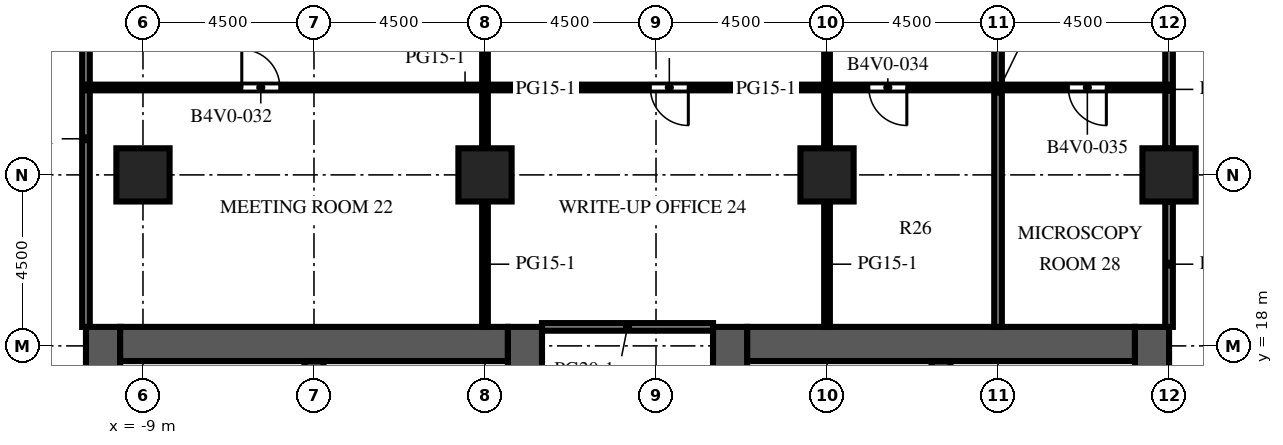
"""IFC4 building model, lengths in metres.
Left out: names, types, materials, properties, quantities, classifications, styles, units other than length and angle.
Written with IfcOpenShell. Run it as: python <this file> out.ifc"""

import sys

from ifc_helpers import new_model, si_unit, direction, frame, frame_2d, origin, origin_2d, place, context, subcontext, project, spatial, rectangle, extrude, element, fill, save


model = new_model("IFC4")
c1 = context("Model", 3, precision=1e-05, world=origin(), true_north=direction((0.0, 1.0)))
c2 = subcontext(c1, "Body", "Model", "MODEL_VIEW")
j1 = project(units=[si_unit("LENGTHUNIT", "METRE"), si_unit("PLANEANGLEUNIT", "RADIAN")], contexts=[c1])
p1 = place(None, origin())
s1 = spatial("IfcSite", under=j1, at=p1, CompositionType="ELEMENT")
p2 = place(p1, origin())
s2 = spatial("IfcBuilding", under=s1, at=p2, CompositionType="ELEMENT")
p3 = place(p2, frame((0.0, 0.0, 120.8)))
s3 = spatial("IfcBuildingStorey", under=s2, at=p3, CompositionType="ELEMENT", Elevation=120.8)
for number, where, z_axis, x_axis in (
    (1, (-9.0, 22.5, 0.0), (0.0, 0.0, 1.0), (1.0, 0.0, 0.0)),
    (2, (0.0, 22.5, 0.0), (0.0, 0.0, 1.0), (1.0, 0.0, 0.0)),
    (3, (9.0, 22.5, 0.0), (0.0, 0.0, 1.0), (1.0, 0.0, 0.0)),
    (4, (18.0, 22.5, 0.0), (0.0, 0.0, 1.0), (1.0, 0.0, 0.0)),
):
    element("IfcColumn", number, at=place(p3, frame(where, z_axis=z_axis, x_axis=x_axis)), inside=s3, PredefinedType="COLUMN", context=c2, shape_type="SweptSolid", body=[
        extrude(rectangle(XDim=1.4, YDim=1.4, at=origin_2d()), origin(), (0.0, 0.0, 1.0), 4.1),
    ])
p4 = place(p3, frame((-10.05, -9.0, 0.0), z_axis=(0.0, 0.0, 1.0), x_axis=(0.0, 1.0, 0.0)))
e5 = element("IfcWall", 5, at=p4, inside=s3, PredefinedType="SHEAR", context=c2, shape_type="SweptSolid", body=[
    extrude(rectangle(XDim=27.5, YDim=0.9, at=frame_2d((13.75, 0.0))), origin(), (0.0, 0.0, 1.0), 4.1),
])
p5 = place(p4, frame((12.55, 0.0, 0.0)))
e6 = element("IfcOpeningElement", 6, at=p5, cuts=e5, PredefinedType="OPENING", context=c2, shape_type="SweptSolid", body=[
    extrude(rectangle(XDim=2.4, YDim=2.4, at=frame_2d((1.2, 1.2))), frame((0.0, 0.46, 0.0), z_axis=(0.0, -1.0, 0.0), x_axis=(1.0, 0.0, 0.0)), (0.0, 0.0, 1.0), 0.92),
])
p6 = place(p4, frame((6.825, 0.0, 0.0)))
e7 = element("IfcOpeningElement", 7, at=p6, cuts=e5, PredefinedType="OPENING", context=c2, shape_type="SweptSolid", body=[
    extrude(rectangle(XDim=1.2, YDim=2.1, at=frame_2d((0.6, 1.05))), frame((0.0, 0.46, 0.0), z_axis=(0.0, -1.0, 0.0), x_axis=(1.0, 0.0, 0.0)), (0.0, 0.0, 1.0), 0.92),
])
p7 = place(p4, frame((19.475, 0.0, 0.0)))
e8 = element("IfcOpeningElement", 8, at=p7, cuts=e5, PredefinedType="OPENING", context=c2, shape_type="SweptSolid", body=[
    extrude(rectangle(XDim=1.2, YDim=2.1, at=frame_2d((0.6, 1.05))), frame((0.0, 0.46, 0.0), z_axis=(0.0, -1.0, 0.0), x_axis=(1.0, 0.0, 0.0)), (0.0, 0.0, 1.0), 0.92),
])
p8 = place(p3, frame((1.05, -9.0, 0.0), z_axis=(0.0, 0.0, 1.0), x_axis=(0.0, 1.0, 0.0)))
e9 = element("IfcWall", 9, at=p8, inside=s3, PredefinedType="SHEAR", context=c2, shape_type="SweptSolid", body=[
    extrude(rectangle(XDim=27.5, YDim=0.9, at=frame_2d((13.75, 0.0))), origin(), (0.0, 0.0, 1.0), 4.1),
])
p9 = place(p8, frame((12.55, 0.0, 0.0)))
e10 = element("IfcOpeningElement", 10, at=p9, cuts=e9, PredefinedType="OPENING", context=c2, shape_type="SweptSolid", body=[
    extrude(rectangle(XDim=2.4, YDim=2.4, at=frame_2d((1.2, 1.2))), frame((0.0, 0.46, 0.0), z_axis=(0.0, -1.0, 0.0), x_axis=(1.0, 0.0, 0.0)), (0.0, 0.0, 1.0), 0.92),
])
p10 = place(p8, frame((3.975, 0.0, 0.0)))
e11 = element("IfcOpeningElement", 11, at=p10, cuts=e9, PredefinedType="OPENING", context=c2, shape_type="SweptSolid", body=[
    extrude(rectangle(XDim=1.2, YDim=2.1, at=frame_2d((0.6, 1.05))), frame((0.0, 0.46, 0.0), z_axis=(0.0, -1.0, 0.0), x_axis=(1.0, 0.0, 0.0)), (0.0, 0.0, 1.0), 0.92),
])
p11 = place(p8, frame((19.485, 0.0, 0.0)))
e12 = element("IfcOpeningElement", 12, at=p11, cuts=e9, PredefinedType="OPENING", context=c2, shape_type="SweptSolid", body=[
    extrude(rectangle(XDim=1.0, YDim=2.1, at=frame_2d((0.5, 1.05))), frame((0.0, 0.46, 0.0), z_axis=(0.0, -1.0, 0.0), x_axis=(1.0, 0.0, 0.0)), (0.0, 0.0, 1.0), 0.92),
])
p12 = place(p8, frame((21.139, 0.0, 0.0)))
e13 = element("IfcOpeningElement", 13, at=p12, cuts=e9, PredefinedType="OPENING", context=c2, shape_type="SweptSolid", body=[
    extrude(rectangle(XDim=1.0, YDim=2.1, at=frame_2d((0.5, 1.05))), frame((0.0, 0.46, 0.0), z_axis=(0.0, -1.0, 0.0), x_axis=(1.0, 0.0, 0.0)), (0.0, 0.0, 1.0), 0.92),
])
p13 = place(p8, frame((23.16, 0.0, 0.0)))
e14 = element("IfcOpeningElement", 14, at=p13, cuts=e9, PredefinedType="OPENING", context=c2, shape_type="SweptSolid", body=[
    extrude(rectangle(XDim=1.0, YDim=2.1, at=frame_2d((0.5, 1.05))), frame((0.0, 0.46, 0.0), z_axis=(0.0, -1.0, 0.0), x_axis=(1.0, 0.0, 0.0)), (0.0, 0.0, 1.0), 0.92),
])
p14 = place(p8, frame((25.181, 0.0, 0.0)))
e15 = element("IfcOpeningElement", 15, at=p14, cuts=e9, PredefinedType="OPENING", context=c2, shape_type="SweptSolid", body=[
    extrude(rectangle(XDim=1.0, YDim=2.1, at=frame_2d((0.5, 1.05))), frame((0.0, 0.46, 0.0), z_axis=(0.0, -1.0, 0.0), x_axis=(1.0, 0.0, 0.0)), (0.0, 0.0, 1.0), 0.92),
])
p15 = place(p3, frame((-9.6, 18.05, 0.0), z_axis=(0.0, 0.0, 1.0), x_axis=(1.0, 0.0, 0.0)))
e16 = element("IfcWall", 16, at=p15, inside=s3, PredefinedType="SHEAR", context=c2, shape_type="SweptSolid", body=[
    extrude(rectangle(XDim=10.2, YDim=0.9, at=frame_2d((5.1, 0.0))), origin(), (0.0, 0.0, 1.0), 4.1),
])
p16 = place(p3, frame((-4.5, 10.25, 0.0), z_axis=(0.0, 0.0, 1.0), x_axis=(0.0, 1.0, 0.0)))
e17 = element("IfcWall", 17, at=p16, inside=s3, PredefinedType="SHEAR", context=c2, shape_type="SweptSolid", body=[
    extrude(rectangle(XDim=7.35, YDim=0.5, at=frame_2d((3.675, 0.0))), origin(), (0.0, 0.0, 1.0), 4.1),
])
p17 = place(p3, frame((6.45, -9.0, 0.0), z_axis=(0.0, 0.0, 1.0), x_axis=(0.0, 1.0, 0.0)))
e18 = element("IfcWall", 18, at=p17, inside=s3, PredefinedType="SHEAR", context=c2, shape_type="SweptSolid", body=[
    extrude(rectangle(XDim=27.5, YDim=0.9, at=frame_2d((13.75, 0.0))), origin(), (0.0, 0.0, 1.0), 4.1),
])
p18 = place(p17, frame((12.55, 0.0, 0.0)))
e19 = element("IfcOpeningElement", 19, at=p18, cuts=e18, PredefinedType="OPENING", context=c2, shape_type="SweptSolid", body=[
    extrude(rectangle(XDim=2.4, YDim=2.4, at=frame_2d((1.2, 1.2))), frame((0.0, 0.46, 0.0), z_axis=(0.0, -1.0, 0.0), x_axis=(1.0, 0.0, 0.0)), (0.0, 0.0, 1.0), 0.92),
])
p19 = place(p17, frame((3.975, 0.0, 0.0)))
e20 = element("IfcOpeningElement", 20, at=p19, cuts=e18, PredefinedType="OPENING", context=c2, shape_type="SweptSolid", body=[
    extrude(rectangle(XDim=1.2, YDim=2.1, at=frame_2d((0.6, 1.05))), frame((0.0, 0.46, 0.0), z_axis=(0.0, -1.0, 0.0), x_axis=(1.0, 0.0, 0.0)), (0.0, 0.0, 1.0), 0.92),
])
p20 = place(p17, frame((19.485, 0.0, 0.0)))
e21 = element("IfcOpeningElement", 21, at=p20, cuts=e18, PredefinedType="OPENING", context=c2, shape_type="SweptSolid", body=[
    extrude(rectangle(XDim=1.0, YDim=2.1, at=frame_2d((0.5, 1.05))), frame((0.0, 0.46, 0.0), z_axis=(0.0, -1.0, 0.0), x_axis=(1.0, 0.0, 0.0)), (0.0, 0.0, 1.0), 0.92),
])
p21 = place(p17, frame((21.139, 0.0, 0.0)))
e22 = element("IfcOpeningElement", 22, at=p21, cuts=e18, PredefinedType="OPENING", context=c2, shape_type="SweptSolid", body=[
    extrude(rectangle(XDim=1.0, YDim=2.1, at=frame_2d((0.5, 1.05))), frame((0.0, 0.46, 0.0), z_axis=(0.0, -1.0, 0.0), x_axis=(1.0, 0.0, 0.0)), (0.0, 0.0, 1.0), 0.92),
])
p22 = place(p17, frame((23.16, 0.0, 0.0)))
e23 = element("IfcOpeningElement", 23, at=p22, cuts=e18, PredefinedType="OPENING", context=c2, shape_type="SweptSolid", body=[
    extrude(rectangle(XDim=1.0, YDim=2.1, at=frame_2d((0.5, 1.05))), frame((0.0, 0.46, 0.0), z_axis=(0.0, -1.0, 0.0), x_axis=(1.0, 0.0, 0.0)), (0.0, 0.0, 1.0), 0.92),
])
p23 = place(p17, frame((25.181, 0.0, 0.0)))
e24 = element("IfcOpeningElement", 24, at=p23, cuts=e18, PredefinedType="OPENING", context=c2, shape_type="SweptSolid", body=[
    extrude(rectangle(XDim=1.0, YDim=2.1, at=frame_2d((0.5, 1.05))), frame((0.0, 0.46, 0.0), z_axis=(0.0, -1.0, 0.0), x_axis=(1.0, 0.0, 0.0)), (0.0, 0.0, 1.0), 0.92),
])
p24 = place(p3, frame((17.55, -9.0, 0.0), z_axis=(0.0, 0.0, 1.0), x_axis=(0.0, 1.0, 0.0)))
e25 = element("IfcWall", 25, at=p24, inside=s3, PredefinedType="SHEAR", context=c2, shape_type="SweptSolid", body=[
    extrude(rectangle(XDim=27.5, YDim=0.9, at=frame_2d((13.75, 0.0))), origin(), (0.0, 0.0, 1.0), 4.1),
])
p25 = place(p24, frame((12.55, 0.0, 0.0)))
e26 = element("IfcOpeningElement", 26, at=p25, cuts=e25, PredefinedType="OPENING", context=c2, shape_type="SweptSolid", body=[
    extrude(rectangle(XDim=2.4, YDim=2.4, at=frame_2d((1.2, 1.2))), frame((0.0, 0.46, 0.0), z_axis=(0.0, -1.0, 0.0), x_axis=(1.0, 0.0, 0.0)), (0.0, 0.0, 1.0), 0.92),
])
p26 = place(p24, frame((6.825, 0.0, 0.0)))
e27 = element("IfcOpeningElement", 27, at=p26, cuts=e25, PredefinedType="OPENING", context=c2, shape_type="SweptSolid", body=[
    extrude(rectangle(XDim=1.2, YDim=2.1, at=frame_2d((0.6, 1.05))), frame((0.0, 0.46, 0.0), z_axis=(0.0, -1.0, 0.0), x_axis=(1.0, 0.0, 0.0)), (0.0, 0.0, 1.0), 0.92),
])
p27 = place(p24, frame((19.475, 0.0, 0.0)))
e28 = element("IfcOpeningElement", 28, at=p27, cuts=e25, PredefinedType="OPENING", context=c2, shape_type="SweptSolid", body=[
    extrude(rectangle(XDim=1.2, YDim=2.1, at=frame_2d((0.6, 1.05))), frame((0.0, 0.46, 0.0), z_axis=(0.0, -1.0, 0.0), x_axis=(1.0, 0.0, 0.0)), (0.0, 0.0, 1.0), 0.92),
])
p28 = place(p3, frame((6.9, 18.05, 0.0), z_axis=(0.0, 0.0, 1.0), x_axis=(1.0, 0.0, 0.0)))
e29 = element("IfcWall", 29, at=p28, inside=s3, PredefinedType="SHEAR", context=c2, shape_type="SweptSolid", body=[
    extrude(rectangle(XDim=10.2, YDim=0.9, at=frame_2d((5.1, 0.0))), origin(), (0.0, 0.0, 1.0), 4.1),
])
p29 = place(p3, frame((12.0, 10.25, 0.0), z_axis=(0.0, 0.0, 1.0), x_axis=(0.0, 1.0, 0.0)))
e30 = element("IfcWall", 30, at=p29, inside=s3, PredefinedType="SHEAR", context=c2, shape_type="SweptSolid", body=[
    extrude(rectangle(XDim=7.35, YDim=0.5, at=frame_2d((3.675, 0.0))), origin(), (0.0, 0.0, 1.0), 4.1),
])
p30 = place(p3, frame((-10.5, 31.35, 0.0), z_axis=(0.0, 0.0, 1.0), x_axis=(0.0, -1.0, 0.0)))
e31 = element("IfcWall", 31, at=p30, inside=s3, PredefinedType="PARTITIONING", context=c2, shape_type="SweptSolid", body=[
    extrude(rectangle(XDim=12.85, YDim=0.2, at=frame_2d((6.425, 0.0))), origin(), (0.0, 0.0, 1.0), 3.65),
])
p31 = place(p30, frame((1.95, 0.0, 0.0)))
e32 = element("IfcOpeningElement", 32, at=p31, cuts=e31, PredefinedType="OPENING", context=c2, shape_type="SweptSolid", body=[
    extrude(rectangle(XDim=1.0, YDim=2.1, at=frame_2d((0.5, 1.05))), frame((0.0, 0.11, 0.0), z_axis=(0.0, -1.0, 0.0), x_axis=(1.0, 0.0, 0.0)), (0.0, 0.0, 1.0), 0.22),
])
p32 = place(p3, frame((0.0, 18.5, 0.0), z_axis=(0.0, 0.0, 1.0), x_axis=(0.0, 1.0, 0.0)))
e33 = element("IfcWall", 33, at=p32, inside=s3, PredefinedType="PARTITIONING", context=c2, shape_type="SweptSolid", body=[
    extrude(rectangle(XDim=3.3, YDim=0.15, at=frame_2d((1.65, 0.0))), origin(), (0.0, 0.0, 1.0), 3.65),
])
p33 = place(p3, frame((0.0, 23.2, 0.0), z_axis=(0.0, 0.0, 1.0), x_axis=(0.0, 1.0, 0.0)))
e34 = element("IfcWall", 34, at=p33, inside=s3, PredefinedType="PARTITIONING", context=c2, shape_type="SweptSolid", body=[
    extrude(rectangle(XDim=3.1, YDim=0.15, at=frame_2d((1.55, 0.0))), origin(), (0.0, 0.0, 1.0), 3.65),
])
p34 = place(p3, frame((9.0, 18.5, 0.0), z_axis=(0.0, 0.0, 1.0), x_axis=(0.0, 1.0, 0.0)))
e35 = element("IfcWall", 35, at=p34, inside=s3, PredefinedType="PARTITIONING", context=c2, shape_type="SweptSolid", body=[
    extrude(rectangle(XDim=3.3, YDim=0.15, at=frame_2d((1.65, 0.0))), origin(), (0.0, 0.0, 1.0), 3.65),
])
p35 = place(p3, frame((9.0, 23.2, 0.0), z_axis=(0.0, 0.0, 1.0), x_axis=(0.0, 1.0, 0.0)))
e36 = element("IfcWall", 36, at=p35, inside=s3, PredefinedType="PARTITIONING", context=c2, shape_type="SweptSolid", body=[
    extrude(rectangle(XDim=3.1, YDim=0.15, at=frame_2d((1.55, 0.0))), origin(), (0.0, 0.0, 1.0), 3.65),
])
p36 = place(p3, frame((13.5, 18.5, 0.0), z_axis=(0.0, 0.0, 1.0), x_axis=(0.0, 1.0, 0.0)))
e37 = element("IfcWall", 37, at=p36, inside=s3, PredefinedType="PARTITIONING", context=c2, shape_type="SweptSolid", body=[
    extrude(rectangle(XDim=12.4, YDim=0.2, at=frame_2d((6.2, 0.0))), origin(), (0.0, 0.0, 1.0), 3.65),
])
p37 = place(p3, frame((18.0, 18.5, 0.0), z_axis=(0.0, 0.0, 1.0), x_axis=(0.0, 1.0, 0.0)))
e38 = element("IfcWall", 38, at=p37, inside=s3, PredefinedType="PARTITIONING", context=c2, shape_type="SweptSolid", body=[
    extrude(rectangle(XDim=3.3, YDim=0.2, at=frame_2d((1.65, 0.0))), origin(), (0.0, 0.0, 1.0), 3.65),
])
p38 = place(p3, frame((18.0, 23.2, 0.0), z_axis=(0.0, 0.0, 1.0), x_axis=(0.0, 1.0, 0.0)))
e39 = element("IfcWall", 39, at=p38, inside=s3, PredefinedType="PARTITIONING", context=c2, shape_type="SweptSolid", body=[
    extrude(rectangle(XDim=3.1, YDim=0.2, at=frame_2d((1.55, 0.0))), origin(), (0.0, 0.0, 1.0), 3.65),
])
p39 = place(p3, frame((1.5, 18.5, 0.0), z_axis=(0.0, 0.0, 1.0), x_axis=(1.0, 0.0, 0.0)))
e40 = element("IfcWall", 40, at=p39, inside=s3, PredefinedType="PARTITIONING", context=c2, shape_type="SweptSolid", body=[
    extrude(rectangle(XDim=4.5, YDim=0.2, at=frame_2d((2.25, 0.0))), origin(), (0.0, 0.0, 1.0), 3.65),
])
p40 = place(p3, frame((18.0, 24.8, 0.0), z_axis=(0.0, 0.0, 1.0), x_axis=(-1.0, 0.0, 0.0)))
e41 = element("IfcWall", 41, at=p40, inside=s3, PredefinedType="PARTITIONING", context=c2, shape_type="SweptSolid", body=[
    extrude(rectangle(XDim=28.5, YDim=0.15, at=frame_2d((14.25, 0.0))), origin(), (0.0, 0.0, 1.0), 3.65),
])
p41 = place(p40, frame((23.4, 0.0, 0.0)))
e42 = element("IfcOpeningElement", 42, at=p41, cuts=e41, PredefinedType="OPENING", context=c2, shape_type="SweptSolid", body=[
    extrude(rectangle(XDim=1.0, YDim=2.1, at=frame_2d((0.5, 1.05))), frame((0.0, 0.085, 0.0), z_axis=(0.0, -1.0, 0.0), x_axis=(1.0, 0.0, 0.0)), (0.0, 0.0, 1.0), 0.17),
])
p42 = place(p40, frame((12.65, 0.0, 0.0)))
e43 = element("IfcOpeningElement", 43, at=p42, cuts=e41, PredefinedType="OPENING", context=c2, shape_type="SweptSolid", body=[
    extrude(rectangle(XDim=1.0, YDim=2.1, at=frame_2d((0.5, 1.05))), frame((0.0, 0.085, 0.0), z_axis=(0.0, -1.0, 0.0), x_axis=(1.0, 0.0, 0.0)), (0.0, 0.0, 1.0), 0.17),
])
p43 = place(p40, frame((6.9, 0.0, 0.0)))
e44 = element("IfcOpeningElement", 44, at=p43, cuts=e41, PredefinedType="OPENING", context=c2, shape_type="SweptSolid", body=[
    extrude(rectangle(XDim=1.0, YDim=2.1, at=frame_2d((0.5, 1.05))), frame((0.0, 0.085, 0.0), z_axis=(0.0, -1.0, 0.0), x_axis=(1.0, 0.0, 0.0)), (0.0, 0.0, 1.0), 0.17),
])
p44 = place(p40, frame((1.65, 0.0, 0.0)))
e45 = element("IfcOpeningElement", 45, at=p44, cuts=e41, PredefinedType="OPENING", context=c2, shape_type="SweptSolid", body=[
    extrude(rectangle(XDim=1.0, YDim=2.1, at=frame_2d((0.5, 1.05))), frame((0.0, 0.085, 0.0), z_axis=(0.0, -1.0, 0.0), x_axis=(1.0, 0.0, 0.0)), (0.0, 0.0, 1.0), 0.17),
])
p45 = place(p41, origin())
e46 = element("IfcDoor", 46, at=p45, inside=s3, OperationType="SINGLE_SWING_RIGHT", PredefinedType="DOOR", context=c2, shape_type="SweptSolid", body=[
    extrude(rectangle(XDim=1.0, YDim=2.1, at=frame_2d((0.5, 1.05))), frame((0.0, 0.025, 0.0), z_axis=(0.0, -1.0, 0.0), x_axis=(1.0, 0.0, 0.0)), (0.0, 0.0, 1.0), 0.05),
])
fill(e42, e46)
p46 = place(p42, origin())
e47 = element("IfcDoor", 47, at=p46, inside=s3, OperationType="SINGLE_SWING_LEFT", PredefinedType="DOOR", context=c2, shape_type="SweptSolid", body=[
    extrude(rectangle(XDim=1.0, YDim=2.1, at=frame_2d((0.5, 1.05))), frame((0.0, 0.025, 0.0), z_axis=(0.0, -1.0, 0.0), x_axis=(1.0, 0.0, 0.0)), (0.0, 0.0, 1.0), 0.05),
])
fill(e43, e47)
p47 = place(p43, origin())
e48 = element("IfcDoor", 48, at=p47, inside=s3, OperationType="SINGLE_SWING_LEFT", PredefinedType="DOOR", context=c2, shape_type="SweptSolid", body=[
    extrude(rectangle(XDim=1.0, YDim=2.1, at=frame_2d((0.5, 1.05))), frame((0.0, 0.025, 0.0), z_axis=(0.0, -1.0, 0.0), x_axis=(1.0, 0.0, 0.0)), (0.0, 0.0, 1.0), 0.05),
])
fill(e44, e48)
p48 = place(p44, origin())
e49 = element("IfcDoor", 49, at=p48, inside=s3, OperationType="SINGLE_SWING_LEFT", PredefinedType="DOOR", context=c2, shape_type="SweptSolid", body=[
    extrude(rectangle(XDim=1.0, YDim=2.1, at=frame_2d((0.5, 1.05))), frame((0.0, 0.025, 0.0), z_axis=(0.0, -1.0, 0.0), x_axis=(1.0, 0.0, 0.0)), (0.0, 0.0, 1.0), 0.05),
])
fill(e45, e49)
save(model, sys.argv[1])
